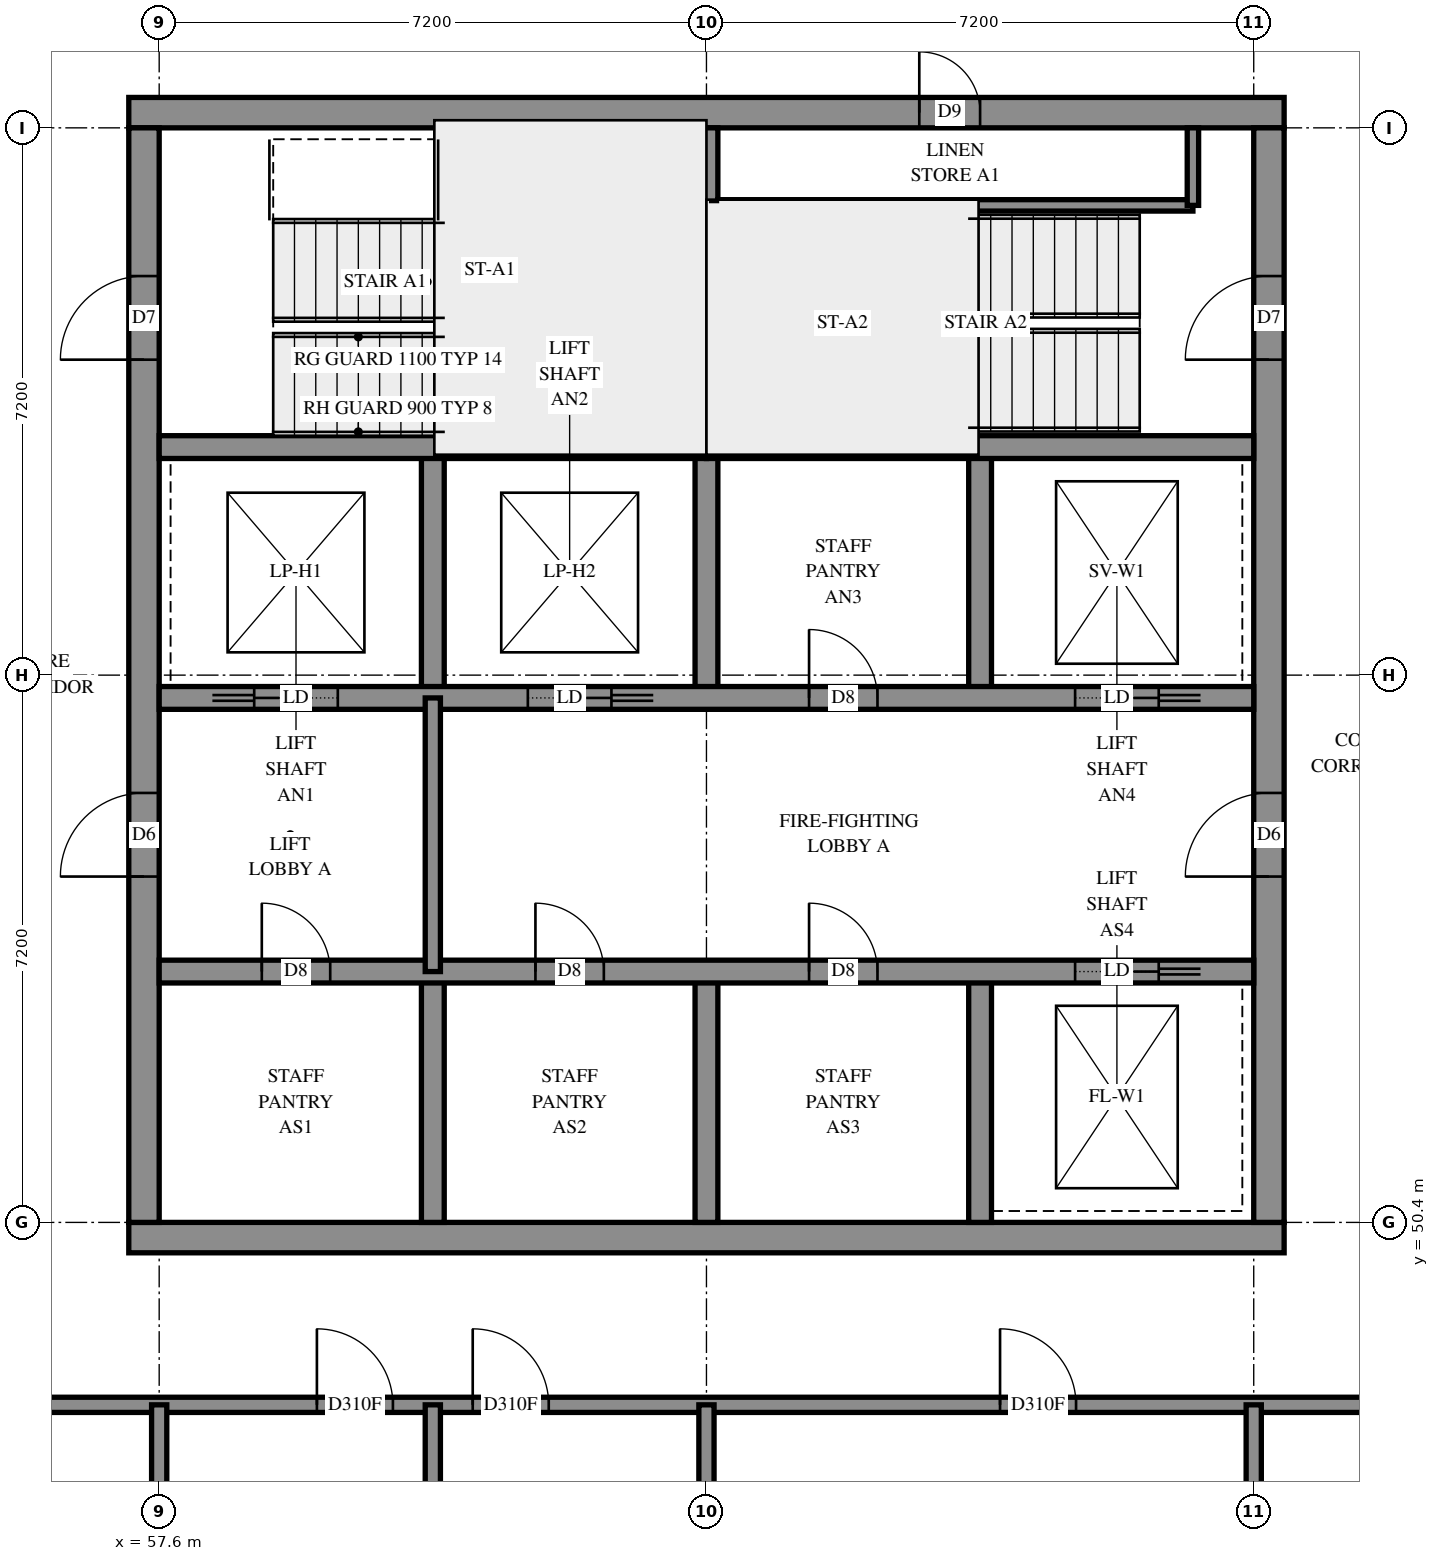
"""IFC4 building model, lengths in metres.
Left out: names, types, materials, properties, quantities, classifications, styles, units other than length and angle.
Written with IfcOpenShell. Run it as: python <this file> out.ifc"""

import sys

from ifc_helpers import new_model, si_unit, direction, frame, frame_2d, origin, place, context, subcontext, project, spatial, rectangle, extrude, element, fill, save


model = new_model("IFC4")
c1 = context("Model", 3, precision=1e-05, world=origin(), true_north=direction((0.0, 1.0)))
c2 = subcontext(c1, "Body", "Model", "MODEL_VIEW")
j1 = project(units=[si_unit("LENGTHUNIT", "METRE"), si_unit("PLANEANGLEUNIT", "RADIAN")], contexts=[c1])
p1 = place(None, origin())
s1 = spatial("IfcSite", under=j1, at=p1, CompositionType="ELEMENT")
p2 = place(p1, origin())
s2 = spatial("IfcBuilding", under=s1, at=p2, CompositionType="ELEMENT")
p3 = place(p2, frame((0.0, 0.0, 277.8)))
s3 = spatial("IfcBuildingStorey", under=s2, at=p3, CompositionType="ELEMENT", Elevation=277.8)
p4 = place(p3, frame((57.2, 50.2, -0.3), z_axis=(0.0, 0.0, 1.0), x_axis=(1.0, 0.0, 0.0)))
e1 = element("IfcWall", 1, at=p4, inside=s3, PredefinedType="SHEAR", context=c2, shape_type="SweptSolid", body=[
    extrude(rectangle(XDim=15.2, YDim=0.4, at=frame_2d((7.6, 0.0))), origin(), (0.0, 0.0, 1.0), 2.7),
])
p5 = place(p3, frame((57.2, 65.0, -0.3), z_axis=(0.0, 0.0, 1.0), x_axis=(1.0, 0.0, 0.0)))
e2 = element("IfcWall", 2, at=p5, inside=s3, PredefinedType="SHEAR", context=c2, shape_type="SweptSolid", body=[
    extrude(rectangle(XDim=15.2, YDim=0.4, at=frame_2d((7.6, 0.0))), origin(), (0.0, 0.0, 1.0), 2.7),
])
p6 = place(p5, frame((10.4, 0.0, 0.3)))
e3 = element("IfcOpeningElement", 3, at=p6, cuts=e2, PredefinedType="OPENING", context=c2, shape_type="SweptSolid", body=[
    extrude(rectangle(XDim=0.8, YDim=2.1, at=frame_2d((0.4, 1.05))), frame((0.0, 0.21, 0.0), z_axis=(0.0, -1.0, 0.0), x_axis=(1.0, 0.0, 0.0)), (0.0, 0.0, 1.0), 0.42),
])
p7 = place(p3, frame((57.4, 50.4, -0.3), z_axis=(0.0, 0.0, 1.0), x_axis=(0.0, 1.0, 0.0)))
e4 = element("IfcWall", 4, at=p7, inside=s3, PredefinedType="SHEAR", context=c2, shape_type="SweptSolid", body=[
    extrude(rectangle(XDim=14.4, YDim=0.4, at=frame_2d((7.2, 0.0))), origin(), (0.0, 0.0, 1.0), 2.7),
])
p8 = place(p7, frame((4.55, 0.0, 0.3)))
e5 = element("IfcOpeningElement", 5, at=p8, cuts=e4, PredefinedType="OPENING", context=c2, shape_type="SweptSolid", body=[
    extrude(rectangle(XDim=1.1, YDim=2.1, at=frame_2d((0.55, 1.05))), frame((0.0, 0.21, 0.0), z_axis=(0.0, -1.0, 0.0), x_axis=(1.0, 0.0, 0.0)), (0.0, 0.0, 1.0), 0.42),
])
p9 = place(p7, frame((11.35, 0.0, 0.3)))
e6 = element("IfcOpeningElement", 6, at=p9, cuts=e4, PredefinedType="OPENING", context=c2, shape_type="SweptSolid", body=[
    extrude(rectangle(XDim=1.1, YDim=2.1, at=frame_2d((0.55, 1.05))), frame((0.0, 0.21, 0.0), z_axis=(0.0, -1.0, 0.0), x_axis=(1.0, 0.0, 0.0)), (0.0, 0.0, 1.0), 0.42),
])
p10 = place(p3, frame((72.2, 50.4, -0.3), z_axis=(0.0, 0.0, 1.0), x_axis=(0.0, 1.0, 0.0)))
e7 = element("IfcWall", 7, at=p10, inside=s3, PredefinedType="SHEAR", context=c2, shape_type="SweptSolid", body=[
    extrude(rectangle(XDim=14.4, YDim=0.4, at=frame_2d((7.2, 0.0))), origin(), (0.0, 0.0, 1.0), 2.7),
])
p11 = place(p10, frame((4.55, 0.0, 0.3)))
e8 = element("IfcOpeningElement", 8, at=p11, cuts=e7, PredefinedType="OPENING", context=c2, shape_type="SweptSolid", body=[
    extrude(rectangle(XDim=1.1, YDim=2.1, at=frame_2d((0.55, 1.05))), frame((0.0, 0.21, 0.0), z_axis=(0.0, -1.0, 0.0), x_axis=(1.0, 0.0, 0.0)), (0.0, 0.0, 1.0), 0.42),
])
p12 = place(p10, frame((11.35, 0.0, 0.3)))
e9 = element("IfcOpeningElement", 9, at=p12, cuts=e7, PredefinedType="OPENING", context=c2, shape_type="SweptSolid", body=[
    extrude(rectangle(XDim=1.1, YDim=2.1, at=frame_2d((0.55, 1.05))), frame((0.0, 0.21, 0.0), z_axis=(0.0, -1.0, 0.0), x_axis=(1.0, 0.0, 0.0)), (0.0, 0.0, 1.0), 0.42),
])
for number, where, z_axis, x_axis in (
    (10, (61.2, 50.4, 0.0), (0.0, 0.0, 1.0), (0.0, 1.0, 0.0)),
    (11, (61.2, 57.3, 0.0), (0.0, 0.0, 1.0), (0.0, 1.0, 0.0)),
    (12, (64.8, 50.4, 0.0), (0.0, 0.0, 1.0), (0.0, 1.0, 0.0)),
    (13, (64.8, 57.3, 0.0), (0.0, 0.0, 1.0), (0.0, 1.0, 0.0)),
    (14, (68.4, 50.4, 0.0), (0.0, 0.0, 1.0), (0.0, 1.0, 0.0)),
    (15, (68.4, 57.3, 0.0), (0.0, 0.0, 1.0), (0.0, 1.0, 0.0)),
):
    element("IfcWall", number, at=place(p3, frame(where, z_axis=z_axis, x_axis=x_axis)), inside=s3, PredefinedType="SOLIDWALL", context=c2, shape_type="SweptSolid", body=[
        extrude(rectangle(XDim=3.3, YDim=0.3, at=frame_2d((1.65, 0.0))), origin(), (0.0, 0.0, 1.0), 3.1),
    ])
p13 = place(p3, frame((57.6, 53.7, 0.0), z_axis=(0.0, 0.0, 1.0), x_axis=(1.0, 0.0, 0.0)))
e16 = element("IfcWall", 16, at=p13, inside=s3, PredefinedType="SOLIDWALL", context=c2, shape_type="SweptSolid", body=[
    extrude(rectangle(XDim=14.4, YDim=0.3, at=frame_2d((7.2, 0.0))), origin(), (0.0, 0.0, 1.0), 3.1),
])
p14 = place(p13, frame((1.35, 0.0, 0.0)))
e17 = element("IfcOpeningElement", 17, at=p14, cuts=e16, PredefinedType="OPENING", context=c2, shape_type="SweptSolid", body=[
    extrude(rectangle(XDim=0.9, YDim=2.1, at=frame_2d((0.45, 1.05))), frame((0.0, 0.16, 0.0), z_axis=(0.0, -1.0, 0.0), x_axis=(1.0, 0.0, 0.0)), (0.0, 0.0, 1.0), 0.32),
])
p15 = place(p13, frame((4.95, 0.0, 0.0)))
e18 = element("IfcOpeningElement", 18, at=p15, cuts=e16, PredefinedType="OPENING", context=c2, shape_type="SweptSolid", body=[
    extrude(rectangle(XDim=0.9, YDim=2.1, at=frame_2d((0.45, 1.05))), frame((0.0, 0.16, 0.0), z_axis=(0.0, -1.0, 0.0), x_axis=(1.0, 0.0, 0.0)), (0.0, 0.0, 1.0), 0.32),
])
p16 = place(p13, frame((8.55, 0.0, 0.0)))
e19 = element("IfcOpeningElement", 19, at=p16, cuts=e16, PredefinedType="OPENING", context=c2, shape_type="SweptSolid", body=[
    extrude(rectangle(XDim=0.9, YDim=2.1, at=frame_2d((0.45, 1.05))), frame((0.0, 0.16, 0.0), z_axis=(0.0, -1.0, 0.0), x_axis=(1.0, 0.0, 0.0)), (0.0, 0.0, 1.0), 0.32),
])
p17 = place(p13, frame((12.05, 0.0, 0.0)))
e20 = element("IfcOpeningElement", 20, at=p17, cuts=e16, PredefinedType="OPENING", context=c2, shape_type="SweptSolid", body=[
    extrude(rectangle(XDim=1.1, YDim=2.1, at=frame_2d((0.55, 1.05))), frame((0.0, 0.16, 0.0), z_axis=(0.0, -1.0, 0.0), x_axis=(1.0, 0.0, 0.0)), (0.0, 0.0, 1.0), 0.32),
])
p18 = place(p3, frame((57.6, 57.3, 0.0), z_axis=(0.0, 0.0, 1.0), x_axis=(1.0, 0.0, 0.0)))
e21 = element("IfcWall", 21, at=p18, inside=s3, PredefinedType="SOLIDWALL", context=c2, shape_type="SweptSolid", body=[
    extrude(rectangle(XDim=14.4, YDim=0.3, at=frame_2d((7.2, 0.0))), origin(), (0.0, 0.0, 1.0), 3.1),
])
p19 = place(p18, frame((8.55, 0.0, 0.0)))
e22 = element("IfcOpeningElement", 22, at=p19, cuts=e21, PredefinedType="OPENING", context=c2, shape_type="SweptSolid", body=[
    extrude(rectangle(XDim=0.9, YDim=2.1, at=frame_2d((0.45, 1.05))), frame((0.0, 0.16, 0.0), z_axis=(0.0, -1.0, 0.0), x_axis=(1.0, 0.0, 0.0)), (0.0, 0.0, 1.0), 0.32),
])
p20 = place(p18, frame((1.25, 0.0, 0.0)))
e23 = element("IfcOpeningElement", 23, at=p20, cuts=e21, PredefinedType="OPENING", context=c2, shape_type="SweptSolid", body=[
    extrude(rectangle(XDim=1.1, YDim=2.1, at=frame_2d((0.55, 1.05))), frame((0.0, 0.16, 0.0), z_axis=(0.0, -1.0, 0.0), x_axis=(1.0, 0.0, 0.0)), (0.0, 0.0, 1.0), 0.32),
])
p21 = place(p18, frame((4.85, 0.0, 0.0)))
e24 = element("IfcOpeningElement", 24, at=p21, cuts=e21, PredefinedType="OPENING", context=c2, shape_type="SweptSolid", body=[
    extrude(rectangle(XDim=1.1, YDim=2.1, at=frame_2d((0.55, 1.05))), frame((0.0, 0.16, 0.0), z_axis=(0.0, -1.0, 0.0), x_axis=(1.0, 0.0, 0.0)), (0.0, 0.0, 1.0), 0.32),
])
p22 = place(p18, frame((12.05, 0.0, 0.0)))
e25 = element("IfcOpeningElement", 25, at=p22, cuts=e21, PredefinedType="OPENING", context=c2, shape_type="SweptSolid", body=[
    extrude(rectangle(XDim=1.1, YDim=2.1, at=frame_2d((0.55, 1.05))), frame((0.0, 0.16, 0.0), z_axis=(0.0, -1.0, 0.0), x_axis=(1.0, 0.0, 0.0)), (0.0, 0.0, 1.0), 0.32),
])
for number, where, z_axis, x_axis in (
    (26, (57.6, 60.6, 0.0), (0.0, 0.0, 1.0), (1.0, 0.0, 0.0)),
    (27, (64.8, 60.6, 0.0), (0.0, 0.0, 1.0), (1.0, 0.0, 0.0)),
):
    element("IfcWall", number, at=place(p3, frame(where, z_axis=z_axis, x_axis=x_axis)), inside=s3, PredefinedType="SOLIDWALL", context=c2, shape_type="SweptSolid", body=[
        extrude(rectangle(XDim=7.2, YDim=0.3, at=frame_2d((3.6, 0.0))), origin(), (0.0, 0.0, 1.0), 3.1),
    ])
p23 = place(p3, frame((64.8, 60.6, 0.0), z_axis=(0.0, 0.0, 1.0), x_axis=(0.0, 1.0, 0.0)))
e28 = element("IfcWall", 28, at=p23, inside=s3, PredefinedType="SOLIDWALL", context=c2, shape_type="SweptSolid", body=[
    extrude(rectangle(XDim=4.2, YDim=0.3, at=frame_2d((2.1, 0.0))), origin(), (0.0, 0.0, 1.0), 3.1),
])
p24 = place(p3, frame((64.95, 63.78, 0.0), z_axis=(0.0, 0.0, 1.0), x_axis=(1.0, 0.0, 0.0)))
e29 = element("IfcWall", 29, at=p24, inside=s3, PredefinedType="PARTITIONING", context=c2, shape_type="SweptSolid", body=[
    extrude(rectangle(XDim=6.25, YDim=0.15, at=frame_2d((3.125, 0.0))), origin(), (0.0, 0.0, 1.0), 3.1),
])
p25 = place(p3, frame((71.2, 63.78, 0.0), z_axis=(0.0, 0.0, 1.0), x_axis=(0.0, 1.0, 0.0)))
e30 = element("IfcWall", 30, at=p25, inside=s3, PredefinedType="PARTITIONING", context=c2, shape_type="SweptSolid", body=[
    extrude(rectangle(XDim=1.02, YDim=0.15, at=frame_2d((0.51, 0.0))), origin(), (0.0, 0.0, 1.0), 3.1),
])
p26 = place(p3, frame((61.2, 53.7, 0.0), z_axis=(0.0, 0.0, 1.0), x_axis=(0.0, 1.0, 0.0)))
e31 = element("IfcWall", 31, at=p26, inside=s3, PredefinedType="PARTITIONING", context=c2, shape_type="SweptSolid", body=[
    extrude(rectangle(XDim=3.6, YDim=0.2, at=frame_2d((1.8, 0.0))), origin(), (0.0, 0.0, 1.0), 3.1),
])
p27 = place(p3, frame((55.2, 48.0, 0.0), z_axis=(0.0, 0.0, 1.0), x_axis=(1.0, 0.0, 0.0)))
e32 = element("IfcWall", 32, at=p27, inside=s3, PredefinedType="PARTITIONING", context=c2, shape_type="SweptSolid", body=[
    extrude(rectangle(XDim=19.15, YDim=0.2, at=frame_2d((9.575, 0.0))), origin(), (0.0, 0.0, 1.0), 3.1),
])
p28 = place(p27, frame((4.475, 0.0, 0.0)))
e33 = element("IfcOpeningElement", 33, at=p28, cuts=e32, PredefinedType="OPENING", context=c2, shape_type="SweptSolid", body=[
    extrude(rectangle(XDim=1.0, YDim=2.1, at=frame_2d((0.5, 1.05))), frame((0.0, 0.11, 0.0), z_axis=(0.0, -1.0, 0.0), x_axis=(1.0, 0.0, 0.0)), (0.0, 0.0, 1.0), 0.22),
])
p29 = place(p27, frame((6.525, 0.0, 0.0)))
e34 = element("IfcOpeningElement", 34, at=p29, cuts=e32, PredefinedType="OPENING", context=c2, shape_type="SweptSolid", body=[
    extrude(rectangle(XDim=1.0, YDim=2.1, at=frame_2d((0.5, 1.05))), frame((0.0, 0.11, 0.0), z_axis=(0.0, -1.0, 0.0), x_axis=(1.0, 0.0, 0.0)), (0.0, 0.0, 1.0), 0.22),
])
p30 = place(p27, frame((13.463, 0.0, 0.0)))
e35 = element("IfcOpeningElement", 35, at=p30, cuts=e32, PredefinedType="OPENING", context=c2, shape_type="SweptSolid", body=[
    extrude(rectangle(XDim=1.0, YDim=2.1, at=frame_2d((0.5, 1.05))), frame((0.0, 0.11, 0.0), z_axis=(0.0, -1.0, 0.0), x_axis=(1.0, 0.0, 0.0)), (0.0, 0.0, 1.0), 0.22),
])
p31 = place(p3, frame((61.2, 42.266, 0.0), z_axis=(0.0, 0.0, 1.0), x_axis=(0.0, 1.0, 0.0)))
e36 = element("IfcWall", 36, at=p31, inside=s3, PredefinedType="PARTITIONING", context=c2, shape_type="SweptSolid", body=[
    extrude(rectangle(XDim=5.734, YDim=0.2, at=frame_2d((2.867, 0.0))), origin(), (0.0, 0.0, 1.0), 3.1),
])
for number, where, z_axis, x_axis in (
    (37, (57.6, 43.55, 0.0), (0.0, 0.0, 1.0), (0.0, 1.0, 0.0)),
    (38, (64.8, 43.55, 0.0), (0.0, 0.0, 1.0), (0.0, 1.0, 0.0)),
    (39, (72.0, 43.55, 0.0), (0.0, 0.0, 1.0), (0.0, 1.0, 0.0)),
):
    element("IfcWall", number, at=place(p3, frame(where, z_axis=z_axis, x_axis=x_axis)), inside=s3, PredefinedType="PARTITIONING", context=c2, shape_type="SweptSolid", body=[
        extrude(rectangle(XDim=4.45, YDim=0.2, at=frame_2d((2.225, 0.0))), origin(), (0.0, 0.0, 1.0), 3.1),
    ])
p32 = place(p6, origin())
e40 = element("IfcDoor", 40, at=p32, inside=s3, OperationType="SINGLE_SWING_RIGHT", PredefinedType="DOOR", context=c2, shape_type="SweptSolid", body=[
    extrude(rectangle(XDim=0.8, YDim=2.1, at=frame_2d((0.4, 1.05))), frame((0.0, 0.025, 0.0), z_axis=(0.0, -1.0, 0.0), x_axis=(1.0, 0.0, 0.0)), (0.0, 0.0, 1.0), 0.05),
])
fill(e3, e40)
p33 = place(p8, origin())
e41 = element("IfcDoor", 41, at=p33, inside=s3, OperationType="DOUBLE_DOOR_SINGLE_SWING", PredefinedType="DOOR", context=c2, shape_type="SweptSolid", body=[
    extrude(rectangle(XDim=1.1, YDim=2.1, at=frame_2d((0.55, 1.05))), frame((0.0, 0.025, 0.0), z_axis=(0.0, -1.0, 0.0), x_axis=(1.0, 0.0, 0.0)), (0.0, 0.0, 1.0), 0.05),
])
fill(e5, e41)
p34 = place(p11, origin())
e42 = element("IfcDoor", 42, at=p34, inside=s3, OperationType="DOUBLE_DOOR_SINGLE_SWING", PredefinedType="DOOR", context=c2, shape_type="SweptSolid", body=[
    extrude(rectangle(XDim=1.1, YDim=2.1, at=frame_2d((0.55, 1.05))), frame((0.0, 0.025, 0.0), z_axis=(0.0, -1.0, 0.0), x_axis=(1.0, 0.0, 0.0)), (0.0, 0.0, 1.0), 0.05),
])
fill(e8, e42)
p35 = place(p9, origin())
e43 = element("IfcDoor", 43, at=p35, inside=s3, OperationType="SINGLE_SWING_LEFT", PredefinedType="DOOR", context=c2, shape_type="SweptSolid", body=[
    extrude(rectangle(XDim=1.1, YDim=2.1, at=frame_2d((0.55, 1.05))), frame((0.0, 0.025, 0.0), z_axis=(0.0, -1.0, 0.0), x_axis=(1.0, 0.0, 0.0)), (0.0, 0.0, 1.0), 0.05),
])
fill(e6, e43)
p36 = place(p12, origin())
e44 = element("IfcDoor", 44, at=p36, inside=s3, OperationType="SINGLE_SWING_RIGHT", PredefinedType="DOOR", context=c2, shape_type="SweptSolid", body=[
    extrude(rectangle(XDim=1.1, YDim=2.1, at=frame_2d((0.55, 1.05))), frame((0.0, 0.025, 0.0), z_axis=(0.0, -1.0, 0.0), x_axis=(1.0, 0.0, 0.0)), (0.0, 0.0, 1.0), 0.05),
])
fill(e9, e44)
p37 = place(p14, origin())
e45 = element("IfcDoor", 45, at=p37, inside=s3, OperationType="SINGLE_SWING_LEFT", PredefinedType="DOOR", context=c2, shape_type="SweptSolid", body=[
    extrude(rectangle(XDim=0.9, YDim=2.1, at=frame_2d((0.45, 1.05))), frame((0.0, 0.025, 0.0), z_axis=(0.0, -1.0, 0.0), x_axis=(1.0, 0.0, 0.0)), (0.0, 0.0, 1.0), 0.05),
])
fill(e17, e45)
p38 = place(p15, origin())
e46 = element("IfcDoor", 46, at=p38, inside=s3, OperationType="SINGLE_SWING_LEFT", PredefinedType="DOOR", context=c2, shape_type="SweptSolid", body=[
    extrude(rectangle(XDim=0.9, YDim=2.1, at=frame_2d((0.45, 1.05))), frame((0.0, 0.025, 0.0), z_axis=(0.0, -1.0, 0.0), x_axis=(1.0, 0.0, 0.0)), (0.0, 0.0, 1.0), 0.05),
])
fill(e18, e46)
p39 = place(p16, origin())
e47 = element("IfcDoor", 47, at=p39, inside=s3, OperationType="SINGLE_SWING_LEFT", PredefinedType="DOOR", context=c2, shape_type="SweptSolid", body=[
    extrude(rectangle(XDim=0.9, YDim=2.1, at=frame_2d((0.45, 1.05))), frame((0.0, 0.025, 0.0), z_axis=(0.0, -1.0, 0.0), x_axis=(1.0, 0.0, 0.0)), (0.0, 0.0, 1.0), 0.05),
])
fill(e19, e47)
p40 = place(p19, origin())
e48 = element("IfcDoor", 48, at=p40, inside=s3, OperationType="SINGLE_SWING_LEFT", PredefinedType="DOOR", context=c2, shape_type="SweptSolid", body=[
    extrude(rectangle(XDim=0.9, YDim=2.1, at=frame_2d((0.45, 1.05))), frame((0.0, 0.025, 0.0), z_axis=(0.0, -1.0, 0.0), x_axis=(1.0, 0.0, 0.0)), (0.0, 0.0, 1.0), 0.05),
])
fill(e22, e48)
p41 = place(p17, origin())
e49 = element("IfcDoor", 49, at=p41, inside=s3, OperationType="SLIDING_TO_RIGHT", PredefinedType="DOOR", context=c2, shape_type="SweptSolid", body=[
    extrude(rectangle(XDim=1.1, YDim=2.1, at=frame_2d((0.55, 1.05))), frame((0.0, 0.025, 0.0), z_axis=(0.0, -1.0, 0.0), x_axis=(1.0, 0.0, 0.0)), (0.0, 0.0, 1.0), 0.05),
])
fill(e20, e49)
p42 = place(p20, origin())
e50 = element("IfcDoor", 50, at=p42, inside=s3, OperationType="SLIDING_TO_LEFT", PredefinedType="DOOR", context=c2, shape_type="SweptSolid", body=[
    extrude(rectangle(XDim=1.1, YDim=2.1, at=frame_2d((0.55, 1.05))), frame((0.0, 0.025, 0.0), z_axis=(0.0, -1.0, 0.0), x_axis=(1.0, 0.0, 0.0)), (0.0, 0.0, 1.0), 0.05),
])
fill(e23, e50)
p43 = place(p21, origin())
e51 = element("IfcDoor", 51, at=p43, inside=s3, OperationType="SLIDING_TO_RIGHT", PredefinedType="DOOR", context=c2, shape_type="SweptSolid", body=[
    extrude(rectangle(XDim=1.1, YDim=2.1, at=frame_2d((0.55, 1.05))), frame((0.0, 0.025, 0.0), z_axis=(0.0, -1.0, 0.0), x_axis=(1.0, 0.0, 0.0)), (0.0, 0.0, 1.0), 0.05),
])
fill(e24, e51)
p44 = place(p22, origin())
e52 = element("IfcDoor", 52, at=p44, inside=s3, OperationType="SLIDING_TO_RIGHT", PredefinedType="DOOR", context=c2, shape_type="SweptSolid", body=[
    extrude(rectangle(XDim=1.1, YDim=2.1, at=frame_2d((0.55, 1.05))), frame((0.0, 0.025, 0.0), z_axis=(0.0, -1.0, 0.0), x_axis=(1.0, 0.0, 0.0)), (0.0, 0.0, 1.0), 0.05),
])
fill(e25, e52)
p45 = place(p28, origin())
e53 = element("IfcDoor", 53, at=p45, inside=s3, OperationType="SINGLE_SWING_LEFT", PredefinedType="DOOR", context=c2, shape_type="SweptSolid", body=[
    extrude(rectangle(XDim=1.0, YDim=2.1, at=frame_2d((0.5, 1.05))), frame((0.0, 0.025, 0.0), z_axis=(0.0, -1.0, 0.0), x_axis=(1.0, 0.0, 0.0)), (0.0, 0.0, 1.0), 0.05),
])
fill(e33, e53)
p46 = place(p29, origin())
e54 = element("IfcDoor", 54, at=p46, inside=s3, OperationType="SINGLE_SWING_RIGHT", PredefinedType="DOOR", context=c2, shape_type="SweptSolid", body=[
    extrude(rectangle(XDim=1.0, YDim=2.1, at=frame_2d((0.5, 1.05))), frame((0.0, 0.025, 0.0), z_axis=(0.0, -1.0, 0.0), x_axis=(1.0, 0.0, 0.0)), (0.0, 0.0, 1.0), 0.05),
])
fill(e34, e54)
p47 = place(p30, origin())
e55 = element("IfcDoor", 55, at=p47, inside=s3, OperationType="SINGLE_SWING_LEFT", PredefinedType="DOOR", context=c2, shape_type="SweptSolid", body=[
    extrude(rectangle(XDim=1.0, YDim=2.1, at=frame_2d((0.5, 1.05))), frame((0.0, 0.025, 0.0), z_axis=(0.0, -1.0, 0.0), x_axis=(1.0, 0.0, 0.0)), (0.0, 0.0, 1.0), 0.05),
])
fill(e35, e55)
save(model, sys.argv[1])
